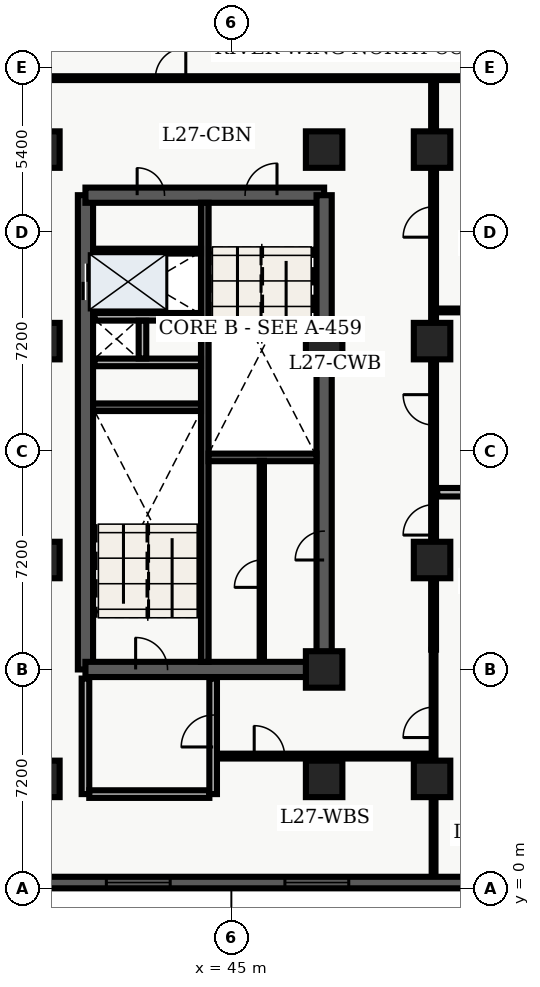
"""IFC4 building model, lengths in metres.
Left out: names, types, materials, properties, quantities, classifications, styles, units other than length and angle.
Written with IfcOpenShell. Run it as: python <this file> out.ifc"""

import sys

from ifc_helpers import new_model, entity, si_unit, converted_unit, direction, frame, origin_with_axes, origin_2d_with_axis, place, context, subcontext, project, spatial, polyline, rectangle, outline, extrude, element, fill, save


model = new_model("IFC4")
c1 = context("Model", 3, precision=1e-05, world=origin_with_axes(), true_north=direction((0.0, 1.0)))
c2 = subcontext(c1, "Body", "Model", "MODEL_VIEW")
j1 = project(units=[si_unit("LENGTHUNIT", "METRE"), converted_unit("PLANEANGLEUNIT", "DEGREE", entity("IfcPlaneAngleMeasure", 0.017), si_unit("PLANEANGLEUNIT", "RADIAN"), dimensions=[0, 0, 0, 0, 0, 0, 0])], contexts=[c1])
p1 = place(None, origin_with_axes())
s1 = spatial("IfcSite", under=j1, at=p1, CompositionType="ELEMENT")
p2 = place(p1, origin_with_axes())
s2 = spatial("IfcBuilding", under=s1, at=p2, CompositionType="ELEMENT")
p3 = place(p2, frame((0.0, 0.0, 112.5), z_axis=(0.0, 0.0, 1.0), x_axis=(1.0, 0.0, 0.0)))
s3 = spatial("IfcBuildingStorey", under=s2, at=p3, CompositionType="ELEMENT", Elevation=112.5)
p4 = place(p3, frame((40.2, 7.2, 0.0), z_axis=(0.0, 0.0, 1.0), x_axis=(0.0, 1.0, 0.0)))
e1 = element("IfcWall", 1, at=p4, inside=s3, PredefinedType="SHEAR", context=c2, shape_type="SweptSolid", body=[
    extrude(outline(polyline([(0.0, -0.25), (15.6, -0.25), (15.6, 0.25), (0.0, 0.25), (0.0, -0.25)])), origin_with_axes(), (0.0, 0.0, 1.0), 3.66),
])
p5 = place(p4, frame((12.75, 0.0, 0.0), z_axis=(0.0, 0.0, 1.0), x_axis=(1.0, 0.0, 0.0)))
e2 = element("IfcOpeningElement", 2, at=p5, cuts=e1, PredefinedType="OPENING", context=c2, shape_type="SweptSolid", body=[
    extrude(rectangle(XDim=1.2, YDim=0.52, at=origin_2d_with_axis()), origin_with_axes(), (0.0, 0.0, 1.0), 2.15),
])
p6 = place(p3, frame((40.2, 7.2, 0.0), z_axis=(0.0, 0.0, 1.0), x_axis=(1.0, 0.0, 0.0)))
e3 = element("IfcWall", 3, at=p6, inside=s3, PredefinedType="SHEAR", context=c2, shape_type="SweptSolid", body=[
    extrude(outline(polyline([(0.0, -0.25), (7.85, -0.25), (7.85, 0.25), (0.0, 0.25), (0.0, -0.25)])), origin_with_axes(), (0.0, 0.0, 1.0), 3.66),
])
p7 = place(p6, frame((2.175, 0.0, 0.0), z_axis=(0.0, 0.0, 1.0), x_axis=(1.0, 0.0, 0.0)))
e4 = element("IfcOpeningElement", 4, at=p7, cuts=e3, PredefinedType="OPENING", context=c2, shape_type="SweptSolid", body=[
    extrude(rectangle(XDim=1.05, YDim=0.52, at=origin_2d_with_axis()), origin_with_axes(), (0.0, 0.0, 1.0), 2.15),
])
p8 = place(p3, frame((40.2, 22.8, 0.0), z_axis=(0.0, 0.0, 1.0), x_axis=(1.0, 0.0, 0.0)))
e5 = element("IfcWall", 5, at=p8, inside=s3, PredefinedType="SHEAR", context=c2, shape_type="SweptSolid", body=[
    extrude(outline(polyline([(0.0, -0.25), (7.85, -0.25), (7.85, 0.25), (0.0, 0.25), (0.0, -0.25)])), origin_with_axes(), (0.0, 0.0, 1.0), 3.66),
])
p9 = place(p8, frame((5.775, 0.0, 0.0), z_axis=(0.0, 0.0, 1.0), x_axis=(1.0, 0.0, 0.0)))
e6 = element("IfcOpeningElement", 6, at=p9, cuts=e5, PredefinedType="OPENING", context=c2, shape_type="SweptSolid", body=[
    extrude(rectangle(XDim=1.05, YDim=0.52, at=origin_2d_with_axis()), origin_with_axes(), (0.0, 0.0, 1.0), 2.15),
])
p10 = place(p8, frame((2.15, 0.0, 0.0), z_axis=(0.0, 0.0, 1.0), x_axis=(1.0, 0.0, 0.0)))
e7 = element("IfcOpeningElement", 7, at=p10, cuts=e5, PredefinedType="OPENING", context=c2, shape_type="SweptSolid", body=[
    extrude(rectangle(XDim=0.9, YDim=0.52, at=origin_2d_with_axis()), origin_with_axes(), (0.0, 0.0, 1.0), 2.15),
])
p11 = place(p3, frame((48.05, 7.2, 0.0), z_axis=(0.0, 0.0, 1.0), x_axis=(0.0, 1.0, 0.0)))
e8 = element("IfcWall", 8, at=p11, inside=s3, PredefinedType="SHEAR", context=c2, shape_type="SweptSolid", body=[
    extrude(outline(polyline([(0.0, -0.25), (15.6, -0.25), (15.6, 0.25), (0.0, 0.25), (0.0, -0.25)])), origin_with_axes(), (0.0, 0.0, 1.0), 3.66),
])
p12 = place(p11, frame((4.075, 0.0, 0.0), z_axis=(0.0, 0.0, 1.0), x_axis=(1.0, 0.0, 0.0)))
e9 = element("IfcOpeningElement", 9, at=p12, cuts=e8, PredefinedType="OPENING", context=c2, shape_type="SweptSolid", body=[
    extrude(rectangle(XDim=0.95, YDim=0.52, at=origin_2d_with_axis()), origin_with_axes(), (0.0, 0.0, 1.0), 2.15),
])
p13 = place(p3, frame((44.125, 7.45, 0.0), z_axis=(0.0, 0.0, 1.0), x_axis=(0.0, 1.0, 0.0)))
e10 = element("IfcWall", 10, at=p13, inside=s3, PredefinedType="SHEAR", context=c2, shape_type="SweptSolid", body=[
    extrude(outline(polyline([(0.0, -0.125), (15.1, -0.125), (15.1, 0.125), (0.0, 0.125), (0.0, -0.125)])), origin_with_axes(), (0.0, 0.0, 1.0), 3.66),
])
for number, where, z_axis, x_axis in (
    (11, (40.45, 15.825, 0.0), (0.0, 0.0, 1.0), (1.0, 0.0, 0.0)),
    (12, (44.25, 14.175, 0.0), (0.0, 0.0, 1.0), (1.0, 0.0, 0.0)),
):
    element("IfcWall", number, at=place(p3, frame(where, z_axis=z_axis, x_axis=x_axis)), inside=s3, PredefinedType="SHEAR", context=c2, shape_type="SweptSolid", body=[
        extrude(outline(polyline([(0.0, -0.125), (3.55, -0.125), (3.55, 0.125), (0.0, 0.125), (0.0, -0.125)])), origin_with_axes(), (0.0, 0.0, 1.0), 3.66),
    ])
for number, where, z_axis, x_axis in (
    (13, (40.5, 17.3, 0.0), (0.0, 0.0, 1.0), (1.0, 0.0, 0.0)),
    (14, (40.5, 18.8, 0.0), (0.0, 0.0, 1.0), (1.0, 0.0, 0.0)),
):
    element("IfcWall", number, at=place(p3, frame(where, z_axis=z_axis, x_axis=x_axis)), inside=s3, PredefinedType="SOLIDWALL", context=c2, shape_type="SweptSolid", body=[
        extrude(outline(polyline([(0.0, -0.125), (3.5, -0.125), (3.5, 0.125), (0.0, 0.125), (0.0, -0.125)])), origin_with_axes(), (0.0, 0.0, 1.0), 2.7),
    ])
p14 = place(p3, frame((42.075, 17.43, 0.0), z_axis=(0.0, 0.0, 1.0), x_axis=(0.0, 1.0, 0.0)))
e15 = element("IfcWall", 15, at=p14, inside=s3, PredefinedType="SOLIDWALL", context=c2, shape_type="SweptSolid", body=[
    extrude(outline(polyline([(0.0, -0.125), (1.24, -0.125), (1.24, 0.125), (0.0, 0.125), (0.0, -0.125)])), origin_with_axes(), (0.0, 0.0, 1.0), 2.7),
])
p15 = place(p3, frame((40.2, 3.1, 0.0), z_axis=(0.0, 0.0, 1.0), x_axis=(0.0, 1.0, 0.0)))
e16 = element("IfcWall", 16, at=p15, inside=s3, PredefinedType="SOLIDWALL", context=c2, shape_type="SweptSolid", body=[
    extrude(outline(polyline([(0.0, -0.125), (3.8, -0.125), (3.8, 0.125), (0.0, 0.125), (0.0, -0.125)])), origin_with_axes(), (0.0, 0.0, 1.0), 2.7),
])
p16 = place(p3, frame((40.325, 3.1, 0.0), z_axis=(0.0, 0.0, 1.0), x_axis=(1.0, 0.0, 0.0)))
e17 = element("IfcWall", 17, at=p16, inside=s3, PredefinedType="SOLIDWALL", context=c2, shape_type="SweptSolid", body=[
    extrude(outline(polyline([(0.0, -0.125), (3.95, -0.125), (3.95, 0.125), (0.0, 0.125), (0.0, -0.125)])), origin_with_axes(), (0.0, 0.0, 1.0), 2.7),
])
p17 = place(p3, frame((44.4, 3.1, 0.0), z_axis=(0.0, 0.0, 1.0), x_axis=(0.0, 1.0, 0.0)))
e18 = element("IfcWall", 18, at=p17, inside=s3, PredefinedType="SOLIDWALL", context=c2, shape_type="SweptSolid", body=[
    extrude(outline(polyline([(0.0, -0.125), (3.8, -0.125), (3.8, 0.125), (0.0, 0.125), (0.0, -0.125)])), origin_with_axes(), (0.0, 0.0, 1.0), 2.7),
])
p18 = place(p17, frame((2.075, 0.0, 0.0), z_axis=(0.0, 0.0, 1.0), x_axis=(1.0, 0.0, 0.0)))
e19 = element("IfcOpeningElement", 19, at=p18, cuts=e18, PredefinedType="OPENING", context=c2, shape_type="SweptSolid", body=[
    extrude(rectangle(XDim=1.05, YDim=0.27, at=origin_2d_with_axis()), origin_with_axes(), (0.0, 0.0, 1.0), 2.15),
])
for number, where, z_axis, x_axis in (
    (20, (38.75, 3.6, 0.0), (0.0, 0.0, 1.0), (1.0, 0.0, 0.0)),
    (21, (38.75, 10.8, 0.0), (0.0, 0.0, 1.0), (1.0, 0.0, 0.0)),
    (22, (38.75, 18.0, 0.0), (0.0, 0.0, 1.0), (1.0, 0.0, 0.0)),
    (23, (38.75, 24.3, 0.0), (0.0, 0.0, 1.0), (1.0, 0.0, 0.0)),
    (24, (48.05, 3.6, 0.0), (0.0, 0.0, 1.0), (1.0, 0.0, 0.0)),
    (25, (48.05, 7.2, 0.0), (0.0, 0.0, 1.0), (1.0, 0.0, 0.0)),
    (26, (48.05, 18.0, 0.0), (0.0, 0.0, 1.0), (1.0, 0.0, 0.0)),
    (27, (48.05, 24.3, 0.0), (0.0, 0.0, 1.0), (1.0, 0.0, 0.0)),
    (28, (51.6, 3.6, 0.0), (0.0, 0.0, 1.0), (1.0, 0.0, 0.0)),
    (29, (51.6, 10.8, 0.0), (0.0, 0.0, 1.0), (1.0, 0.0, 0.0)),
    (30, (51.6, 18.0, 0.0), (0.0, 0.0, 1.0), (1.0, 0.0, 0.0)),
    (31, (51.6, 24.3, 0.0), (0.0, 0.0, 1.0), (1.0, 0.0, 0.0)),
):
    element("IfcColumn", number, at=place(p3, frame(where, z_axis=z_axis, x_axis=x_axis)), inside=s3, PredefinedType="COLUMN", context=c2, shape_type="SweptSolid", body=[
        extrude(rectangle(XDim=1.2, YDim=1.2, at=origin_2d_with_axis()), origin_with_axes(), (0.0, 0.0, 1.0), 3.9),
    ])
p19 = place(p3, frame((40.5, 20.96, 0.0), z_axis=(0.0, 0.0, 1.0), x_axis=(1.0, 0.0, 0.0)))
e32 = element("IfcWall", 32, at=p19, inside=s3, PredefinedType="PARTITIONING", context=c2, shape_type="SweptSolid", body=[
    extrude(outline(polyline([(0.0, -0.08), (3.5, -0.08), (3.5, 0.08), (0.0, 0.08), (0.0, -0.08)])), origin_with_axes(), (0.0, 0.0, 1.0), 2.7),
])
p20 = place(p3, frame((46.0, 7.5, 0.0), z_axis=(0.0, 0.0, 1.0), x_axis=(0.0, 1.0, 0.0)))
e33 = element("IfcWall", 33, at=p20, inside=s3, PredefinedType="PARTITIONING", context=c2, shape_type="SweptSolid", body=[
    extrude(outline(polyline([(0.0, -0.07), (6.56, -0.07), (6.56, 0.07), (0.0, 0.07), (0.0, -0.07)])), origin_with_axes(), (0.0, 0.0, 1.0), 2.7),
])
p21 = place(p20, frame((2.85, 0.0, 0.0), z_axis=(0.0, 0.0, 1.0), x_axis=(1.0, 0.0, 0.0)))
e34 = element("IfcOpeningElement", 34, at=p21, cuts=e33, PredefinedType="OPENING", context=c2, shape_type="SweptSolid", body=[
    extrude(rectangle(XDim=0.9, YDim=0.16, at=origin_2d_with_axis()), origin_with_axes(), (0.0, 0.0, 1.0), 2.15),
])
p22 = place(p3, frame((51.65, 7.85, 0.0), z_axis=(0.0, 0.0, 1.0), x_axis=(0.0, 1.0, 0.0)))
e35 = element("IfcWall", 35, at=p22, inside=s3, PredefinedType="PARTITIONING", context=c2, shape_type="SweptSolid", body=[
    extrude(outline(polyline([(0.0, -0.08), (18.8, -0.08), (18.8, 0.08), (0.0, 0.08), (0.0, -0.08)])), origin_with_axes(), (0.0, 0.0, 1.0), 2.7),
])
p23 = place(p22, frame((4.27, 0.0, 0.0), z_axis=(0.0, 0.0, 1.0), x_axis=(1.0, 0.0, 0.0)))
e36 = element("IfcOpeningElement", 36, at=p23, cuts=e35, PredefinedType="OPENING", context=c2, shape_type="SweptSolid", body=[
    extrude(rectangle(XDim=1.0, YDim=0.18, at=origin_2d_with_axis()), origin_with_axes(), (0.0, 0.0, 1.0), 2.15),
])
p24 = place(p22, frame((7.889, 0.0, 0.0), z_axis=(0.0, 0.0, 1.0), x_axis=(1.0, 0.0, 0.0)))
e37 = element("IfcOpeningElement", 37, at=p24, cuts=e35, PredefinedType="OPENING", context=c2, shape_type="SweptSolid", body=[
    extrude(rectangle(XDim=1.0, YDim=0.18, at=origin_2d_with_axis()), origin_with_axes(), (0.0, 0.0, 1.0), 2.15),
])
p25 = place(p22, frame((14.069, 0.0, 0.0), z_axis=(0.0, 0.0, 1.0), x_axis=(1.0, 0.0, 0.0)))
e38 = element("IfcOpeningElement", 38, at=p25, cuts=e35, PredefinedType="OPENING", context=c2, shape_type="SweptSolid", body=[
    extrude(rectangle(XDim=1.0, YDim=0.18, at=origin_2d_with_axis()), origin_with_axes(), (0.0, 0.0, 1.0), 2.15),
])
p26 = place(p3, frame((38.76, 26.65, 0.0), z_axis=(0.0, 0.0, 1.0), x_axis=(1.0, 0.0, 0.0)))
e39 = element("IfcWall", 39, at=p26, inside=s3, PredefinedType="PARTITIONING", context=c2, shape_type="SweptSolid", body=[
    extrude(outline(polyline([(0.0, -0.062), (20.88, -0.062), (20.88, 0.062), (0.0, 0.062), (0.0, -0.062)])), origin_with_axes(), (0.0, 0.0, 1.0), 2.7),
])
p27 = place(p26, frame((4.24, 0.0, 0.0), z_axis=(0.0, 0.0, 1.0), x_axis=(1.0, 0.0, 0.0)))
e40 = element("IfcOpeningElement", 40, at=p27, cuts=e39, PredefinedType="OPENING", context=c2, shape_type="SweptSolid", body=[
    extrude(rectangle(XDim=1.0, YDim=0.145, at=origin_2d_with_axis()), origin_with_axes(), (0.0, 0.0, 1.0), 2.15),
])
p28 = place(p3, frame((44.55, 4.35, 0.0), z_axis=(0.0, 0.0, 1.0), x_axis=(1.0, 0.0, 0.0)))
e41 = element("IfcWall", 41, at=p28, inside=s3, PredefinedType="PARTITIONING", context=c2, shape_type="SweptSolid", body=[
    extrude(outline(polyline([(0.0, -0.08), (7.1, -0.08), (7.1, 0.08), (0.0, 0.08), (0.0, -0.08)])), origin_with_axes(), (0.0, 0.0, 1.0), 2.7),
])
p29 = place(p28, frame((1.7, 0.0, 0.0), z_axis=(0.0, 0.0, 1.0), x_axis=(1.0, 0.0, 0.0)))
e42 = element("IfcOpeningElement", 42, at=p29, cuts=e41, PredefinedType="OPENING", context=c2, shape_type="SweptSolid", body=[
    extrude(rectangle(XDim=1.0, YDim=0.18, at=origin_2d_with_axis()), origin_with_axes(), (0.0, 0.0, 1.0), 2.15),
])
p30 = place(p3, frame((51.65, 0.36, 0.0), z_axis=(0.0, 0.0, 1.0), x_axis=(0.0, 1.0, 0.0)))
e43 = element("IfcWall", 43, at=p30, inside=s3, PredefinedType="PARTITIONING", context=c2, shape_type="SweptSolid", body=[
    extrude(outline(polyline([(0.0, -0.062), (7.49, -0.062), (7.49, 0.062), (0.0, 0.062), (0.0, -0.062)])), origin_with_axes(), (0.0, 0.0, 1.0), 2.7),
])
p31 = place(p30, frame((5.1, 0.0, 0.0), z_axis=(0.0, 0.0, 1.0), x_axis=(1.0, 0.0, 0.0)))
e44 = element("IfcOpeningElement", 44, at=p31, cuts=e43, PredefinedType="OPENING", context=c2, shape_type="SweptSolid", body=[
    extrude(rectangle(XDim=1.0, YDim=0.145, at=origin_2d_with_axis()), origin_with_axes(), (0.0, 0.0, 1.0), 2.15),
])
p32 = place(p3, frame((51.77, 13.029, 0.0), z_axis=(0.0, 0.0, 1.0), x_axis=(1.0, 0.0, 0.0)))
e45 = element("IfcWall", 45, at=p32, inside=s3, PredefinedType="PARTITIONING", context=c2, shape_type="SweptSolid", body=[
    extrude(outline(polyline([(0.0, -0.14), (7.855, -0.14), (7.855, 0.14), (0.0, 0.14), (0.0, -0.14)])), origin_with_axes(), (0.0, 0.0, 1.0), 2.7),
])
p33 = place(p3, frame((51.77, 19.009, 0.0), z_axis=(0.0, 0.0, 1.0), x_axis=(1.0, 0.0, 0.0)))
e46 = element("IfcWall", 46, at=p33, inside=s3, PredefinedType="PARTITIONING", context=c2, shape_type="SweptSolid", body=[
    extrude(outline(polyline([(0.0, -0.062), (7.855, -0.062), (7.855, 0.062), (0.0, 0.062), (0.0, -0.062)])), origin_with_axes(), (0.0, 0.0, 1.0), 2.7),
])
p34 = place(p3, frame((57.22, 0.19, 0.0), z_axis=(0.0, 0.0, 1.0), x_axis=(-1.0, 0.0, 0.0)))
e47 = element("IfcWall", 47, at=p34, inside=s3, PredefinedType="SOLIDWALL", context=c2, shape_type="SweptSolid", body=[
    extrude(outline(polyline([(0.0, -0.19), (18.82, -0.19), (18.82, 0.19), (0.0, 0.19), (0.0, -0.19)])), origin_with_axes(), (0.0, 0.0, 1.0), 3.66),
])
p35 = place(p34, frame((3.537, 0.0, 0.45), z_axis=(0.0, 0.0, 1.0), x_axis=(1.0, 0.0, 0.0)))
e48 = element("IfcOpeningElement", 48, at=p35, cuts=e47, PredefinedType="OPENING", context=c2, shape_type="SweptSolid", body=[
    extrude(rectangle(XDim=2.1, YDim=0.4, at=origin_2d_with_axis()), origin_with_axes(), (0.0, 0.0, 1.0), 2.2),
])
p36 = place(p34, frame((9.41, 0.0, 0.45), z_axis=(0.0, 0.0, 1.0), x_axis=(1.0, 0.0, 0.0)))
e49 = element("IfcOpeningElement", 49, at=p36, cuts=e47, PredefinedType="OPENING", context=c2, shape_type="SweptSolid", body=[
    extrude(rectangle(XDim=2.1, YDim=0.4, at=origin_2d_with_axis()), origin_with_axes(), (0.0, 0.0, 1.0), 2.2),
])
p37 = place(p34, frame((15.283, 0.0, 0.45), z_axis=(0.0, 0.0, 1.0), x_axis=(1.0, 0.0, 0.0)))
e50 = element("IfcOpeningElement", 50, at=p37, cuts=e47, PredefinedType="OPENING", context=c2, shape_type="SweptSolid", body=[
    extrude(rectangle(XDim=2.1, YDim=0.4, at=origin_2d_with_axis()), origin_with_axes(), (0.0, 0.0, 1.0), 2.2),
])
p38 = place(p4, frame((12.75, 0.0, 0.0), z_axis=(0.0, 0.0, 1.0), x_axis=(1.0, 0.0, 0.0)))
e51 = element("IfcDoor", 51, at=p38, inside=s3, OperationType="DOUBLE_DOOR_SLIDING", PredefinedType="DOOR", context=c2, shape_type="SweptSolid", body=[
    extrude(rectangle(XDim=1.2, YDim=0.09, at=origin_2d_with_axis()), origin_with_axes(), (0.0, 0.0, 1.0), 2.15),
])
fill(e2, e51)
p39 = place(p6, frame((2.175, 0.0, 0.0), z_axis=(0.0, 0.0, 1.0), x_axis=(1.0, 0.0, 0.0)))
e52 = element("IfcDoor", 52, at=p39, inside=s3, OperationType="SINGLE_SWING_LEFT", PredefinedType="DOOR", context=c2, shape_type="SweptSolid", body=[
    extrude(rectangle(XDim=1.05, YDim=0.09, at=origin_2d_with_axis()), origin_with_axes(), (0.0, 0.0, 1.0), 2.15),
])
fill(e4, e52)
p40 = place(p8, frame((5.775, 0.0, 0.0), z_axis=(0.0, 0.0, 1.0), x_axis=(1.0, 0.0, 0.0)))
e53 = element("IfcDoor", 53, at=p40, inside=s3, OperationType="SINGLE_SWING_RIGHT", PredefinedType="DOOR", context=c2, shape_type="SweptSolid", body=[
    extrude(rectangle(XDim=1.05, YDim=0.09, at=origin_2d_with_axis()), origin_with_axes(), (0.0, 0.0, 1.0), 2.15),
])
fill(e6, e53)
p41 = place(p17, frame((2.075, 0.0, 0.0), z_axis=(0.0, 0.0, 1.0), x_axis=(1.0, 0.0, 0.0)))
e54 = element("IfcDoor", 54, at=p41, inside=s3, OperationType="SINGLE_SWING_LEFT", PredefinedType="DOOR", context=c2, shape_type="SweptSolid", body=[
    extrude(rectangle(XDim=1.05, YDim=0.09, at=origin_2d_with_axis()), origin_with_axes(), (0.0, 0.0, 1.0), 2.15),
])
fill(e19, e54)
p42 = place(p8, frame((2.15, 0.0, 0.0), z_axis=(0.0, 0.0, 1.0), x_axis=(1.0, 0.0, 0.0)))
e55 = element("IfcDoor", 55, at=p42, inside=s3, OperationType="SINGLE_SWING_LEFT", PredefinedType="DOOR", context=c2, shape_type="SweptSolid", body=[
    extrude(rectangle(XDim=0.9, YDim=0.09, at=origin_2d_with_axis()), origin_with_axes(), (0.0, 0.0, 1.0), 2.15),
])
fill(e7, e55)
p43 = place(p20, frame((2.85, 0.0, 0.0), z_axis=(0.0, 0.0, 1.0), x_axis=(1.0, 0.0, 0.0)))
e56 = element("IfcDoor", 56, at=p43, inside=s3, OperationType="SINGLE_SWING_LEFT", PredefinedType="DOOR", context=c2, shape_type="SweptSolid", body=[
    extrude(rectangle(XDim=0.9, YDim=0.084, at=origin_2d_with_axis()), origin_with_axes(), (0.0, 0.0, 1.0), 2.15),
])
fill(e34, e56)
p44 = place(p11, frame((4.075, 0.0, 0.0), z_axis=(0.0, 0.0, 1.0), x_axis=(1.0, 0.0, 0.0)))
e57 = element("IfcDoor", 57, at=p44, inside=s3, OperationType="SINGLE_SWING_LEFT", PredefinedType="DOOR", context=c2, shape_type="SweptSolid", body=[
    extrude(rectangle(XDim=0.95, YDim=0.09, at=origin_2d_with_axis()), origin_with_axes(), (0.0, 0.0, 1.0), 2.15),
])
fill(e9, e57)
p45 = place(p28, frame((1.7, 0.0, 0.0), z_axis=(0.0, 0.0, 1.0), x_axis=(1.0, 0.0, 0.0)))
e58 = element("IfcDoor", 58, at=p45, inside=s3, OperationType="SINGLE_SWING_LEFT", PredefinedType="DOOR", context=c2, shape_type="SweptSolid", body=[
    extrude(rectangle(XDim=1.0, YDim=0.09, at=origin_2d_with_axis()), origin_with_axes(), (0.0, 0.0, 1.0), 2.15),
])
fill(e42, e58)
p46 = place(p30, frame((5.1, 0.0, 0.0), z_axis=(0.0, 0.0, 1.0), x_axis=(1.0, 0.0, 0.0)))
e59 = element("IfcDoor", 59, at=p46, inside=s3, OperationType="SINGLE_SWING_LEFT", PredefinedType="DOOR", context=c2, shape_type="SweptSolid", body=[
    extrude(rectangle(XDim=1.0, YDim=0.075, at=origin_2d_with_axis()), origin_with_axes(), (0.0, 0.0, 1.0), 2.15),
])
fill(e44, e59)
p47 = place(p26, frame((4.24, 0.0, 0.0), z_axis=(0.0, 0.0, 1.0), x_axis=(1.0, 0.0, 0.0)))
e60 = element("IfcDoor", 60, at=p47, inside=s3, OperationType="SINGLE_SWING_RIGHT", PredefinedType="DOOR", context=c2, shape_type="SweptSolid", body=[
    extrude(rectangle(XDim=1.0, YDim=0.075, at=origin_2d_with_axis()), origin_with_axes(), (0.0, 0.0, 1.0), 2.15),
])
fill(e40, e60)
p48 = place(p22, frame((4.27, 0.0, 0.0), z_axis=(0.0, 0.0, 1.0), x_axis=(1.0, 0.0, 0.0)))
e61 = element("IfcDoor", 61, at=p48, inside=s3, OperationType="SINGLE_SWING_LEFT", PredefinedType="DOOR", context=c2, shape_type="SweptSolid", body=[
    extrude(rectangle(XDim=1.0, YDim=0.09, at=origin_2d_with_axis()), origin_with_axes(), (0.0, 0.0, 1.0), 2.15),
])
fill(e36, e61)
p49 = place(p22, frame((7.889, 0.0, 0.0), z_axis=(0.0, 0.0, 1.0), x_axis=(1.0, 0.0, 0.0)))
e62 = element("IfcDoor", 62, at=p49, inside=s3, OperationType="SINGLE_SWING_RIGHT", PredefinedType="DOOR", context=c2, shape_type="SweptSolid", body=[
    extrude(rectangle(XDim=1.0, YDim=0.09, at=origin_2d_with_axis()), origin_with_axes(), (0.0, 0.0, 1.0), 2.15),
])
fill(e37, e62)
p50 = place(p22, frame((14.069, 0.0, 0.0), z_axis=(0.0, 0.0, 1.0), x_axis=(1.0, 0.0, 0.0)))
e63 = element("IfcDoor", 63, at=p50, inside=s3, OperationType="SINGLE_SWING_LEFT", PredefinedType="DOOR", context=c2, shape_type="SweptSolid", body=[
    extrude(rectangle(XDim=1.0, YDim=0.09, at=origin_2d_with_axis()), origin_with_axes(), (0.0, 0.0, 1.0), 2.15),
])
fill(e38, e63)
p51 = place(p34, frame((9.41, 0.0, 0.45), z_axis=(0.0, 0.0, 1.0), x_axis=(1.0, 0.0, 0.0)))
e64 = element("IfcWindow", 64, at=p51, inside=s3, PredefinedType="WINDOW", context=c2, shape_type="SweptSolid", body=[
    extrude(rectangle(XDim=2.1, YDim=0.09, at=origin_2d_with_axis()), origin_with_axes(), (0.0, 0.0, 1.0), 2.2),
])
fill(e49, e64)
p52 = place(p34, frame((15.283, 0.0, 0.45), z_axis=(0.0, 0.0, 1.0), x_axis=(1.0, 0.0, 0.0)))
e65 = element("IfcWindow", 65, at=p52, inside=s3, PredefinedType="WINDOW", context=c2, shape_type="SweptSolid", body=[
    extrude(rectangle(XDim=2.1, YDim=0.09, at=origin_2d_with_axis()), origin_with_axes(), (0.0, 0.0, 1.0), 2.2),
])
fill(e50, e65)
save(model, sys.argv[1])
